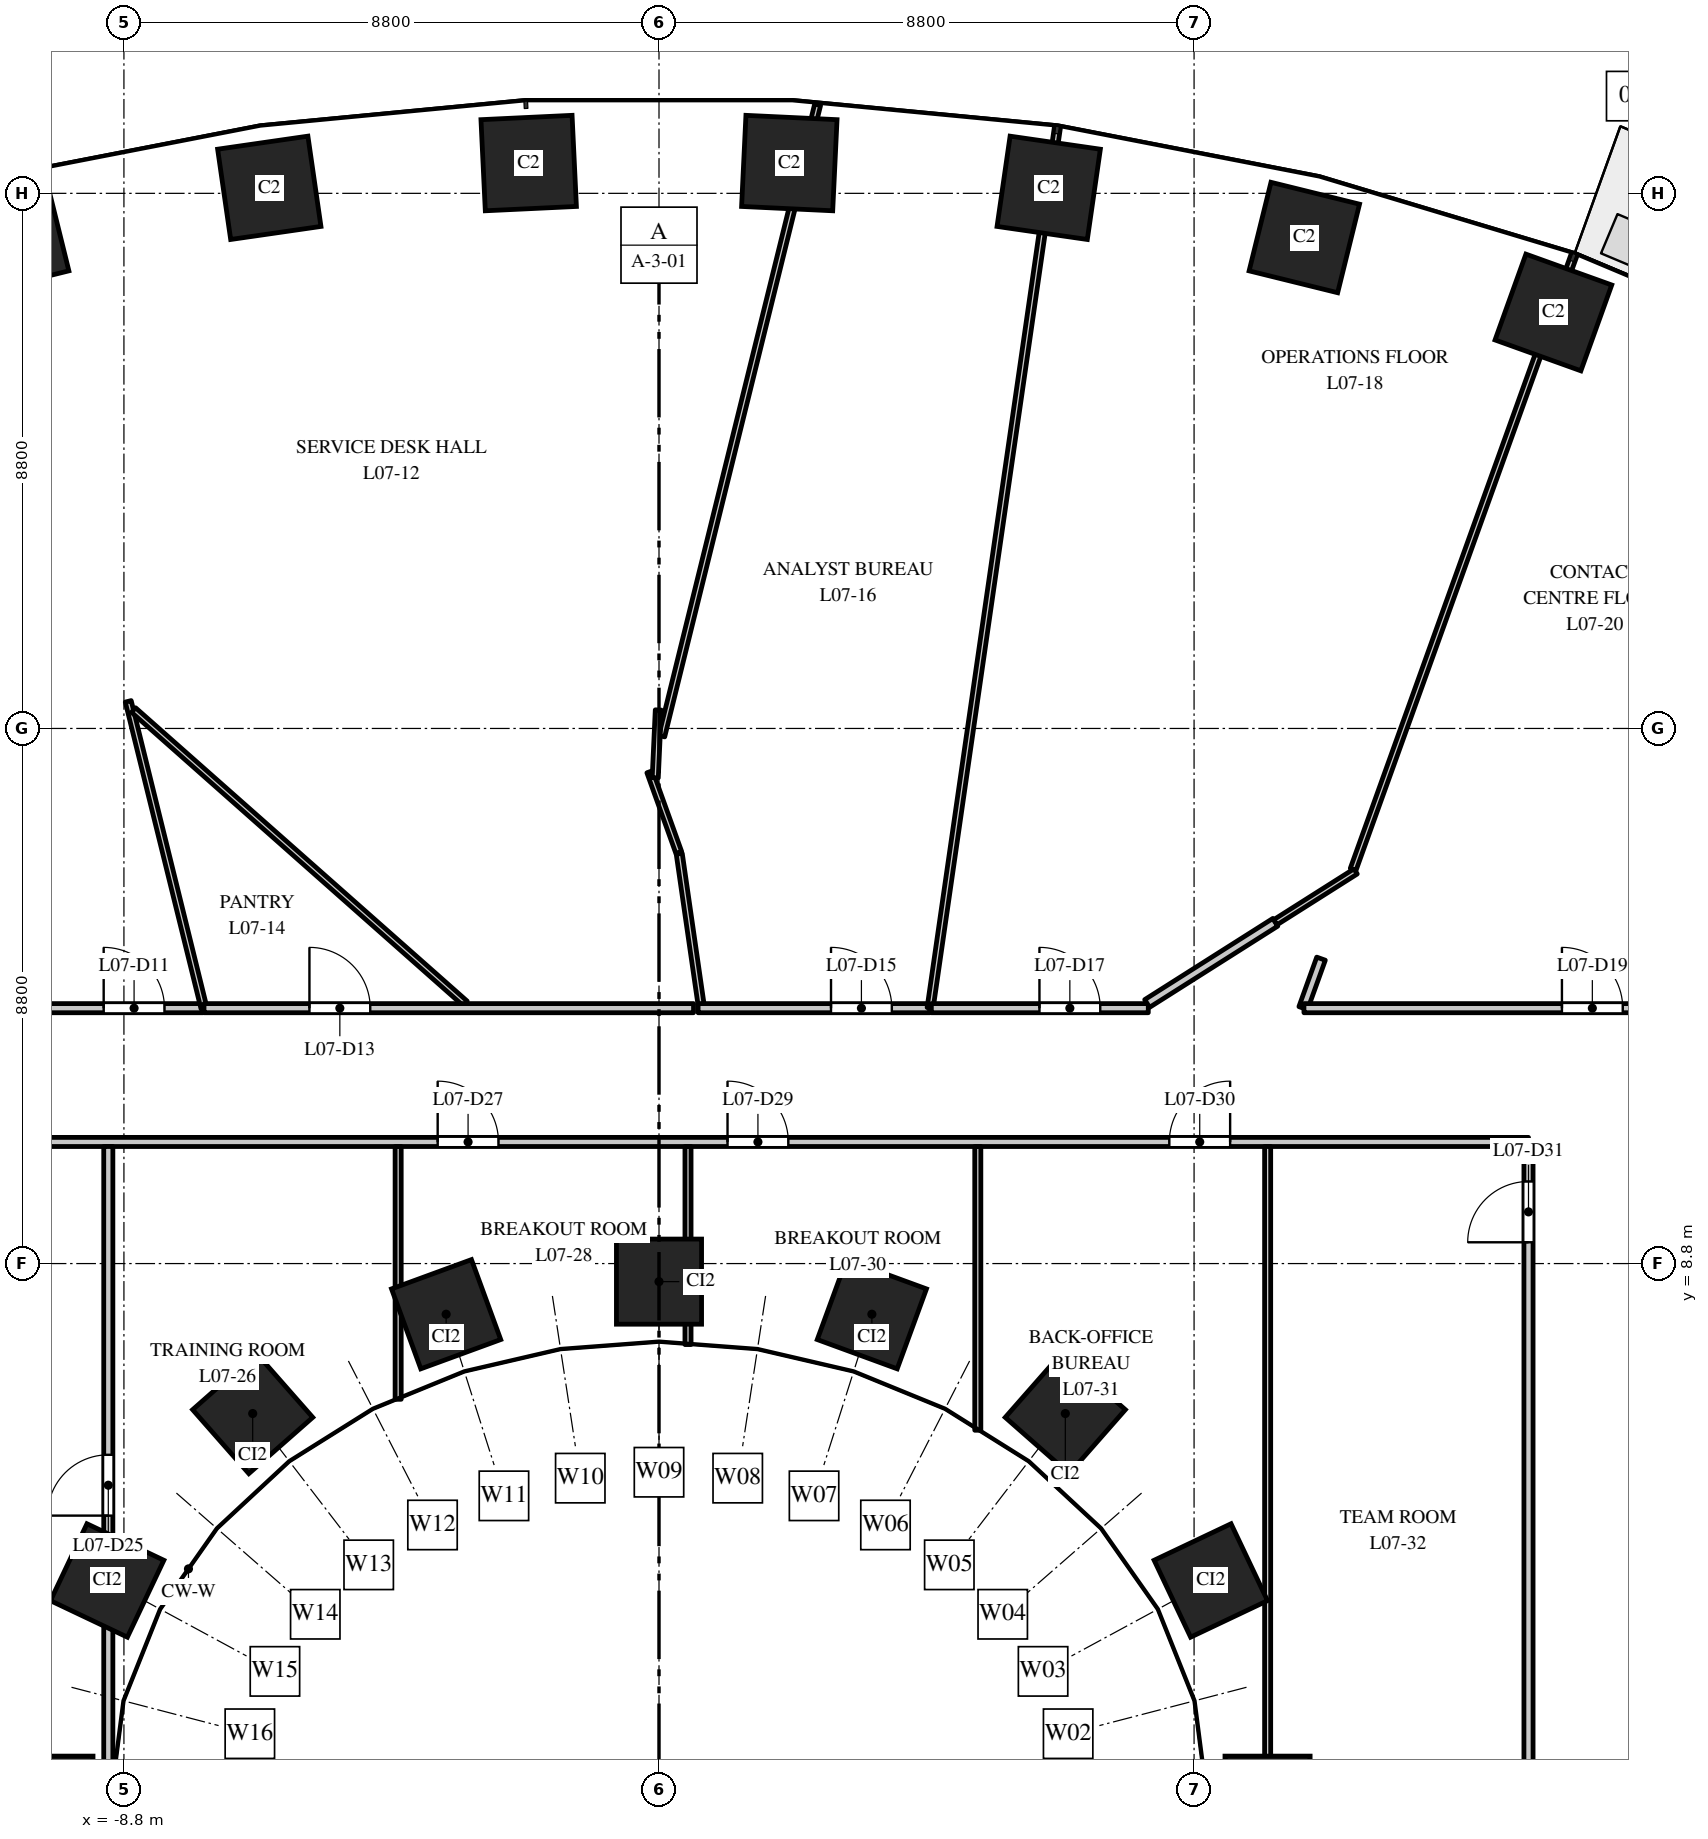
"""IFC4 building model, lengths in metres.
Left out: names, types, materials, properties, quantities, classifications, styles, units other than length and angle.
Written with IfcOpenShell. Run it as: python <this file> out.ifc"""

import sys

from ifc_helpers import new_model, si_unit, direction, frame, frame_2d, origin, origin_2d, place, context, subcontext, project, spatial, rectangle, extrude, element, fill, save


model = new_model("IFC4")
c1 = context("Model", 3, precision=1e-05, world=origin(), true_north=direction((0.0, 1.0)))
c2 = subcontext(c1, "Body", "Model", "MODEL_VIEW")
j1 = project(units=[si_unit("LENGTHUNIT", "METRE"), si_unit("PLANEANGLEUNIT", "RADIAN")], contexts=[c1])
p1 = place(None, origin())
s1 = spatial("IfcSite", under=j1, at=p1, CompositionType="ELEMENT")
p2 = place(p1, origin())
s2 = spatial("IfcBuilding", under=s1, at=p2, CompositionType="ELEMENT")
p3 = place(p2, frame((0.0, 0.0, 38.5)))
s3 = spatial("IfcBuildingStorey", under=s2, at=p3, CompositionType="ELEMENT", Elevation=38.5)
for number, where, z_axis, x_axis in (
    (1, (14.709, 24.441, 0.0), (0.0, 0.0, 1.0), (-0.941, 0.338, 0.0)),
    (2, (10.613, 25.674, 0.0), (0.0, 0.0, 1.0), (-0.971, 0.24, 0.0)),
    (3, (6.409, 26.491, 0.0), (0.0, 0.0, 1.0), (-0.99, 0.143, 0.0)),
    (4, (2.143, 26.898, 0.0), (0.0, 0.0, 1.0), (-0.999, 0.048, 0.0)),
    (5, (-2.143, 26.898, 0.0), (0.0, 0.0, 1.0), (-0.999, -0.048, 0.0)),
    (6, (-6.409, 26.491, 0.0), (0.0, 0.0, 1.0), (-0.99, -0.143, 0.0)),
    (7, (-10.613, 25.674, 0.0), (0.0, 0.0, 1.0), (-0.971, -0.24, 0.0)),
):
    element("IfcColumn", number, at=place(p3, frame(where, z_axis=z_axis, x_axis=x_axis)), inside=s3, PredefinedType="COLUMN", context=c2, shape_type="SweptSolid", body=[
        extrude(rectangle(XDim=1.5, YDim=1.5, at=origin_2d()), origin(), (0.0, 0.0, 1.0), 4.0),
    ])
for number, where, z_axis, x_axis in (
    (8, (10.008, 0.0, 0.0), (0.0, 0.0, 1.0), (0.0, 1.0, 0.0)),
    (9, (9.076, 3.588, 0.0), (0.0, 0.0, 1.0), (-0.429, 0.903, 0.0)),
    (10, (6.682, 6.334, 0.0), (0.0, 0.0, 1.0), (-0.751, 0.66, 0.0)),
    (11, (3.501, 7.967, 0.0), (0.0, 0.0, 1.0), (-0.939, 0.344, 0.0)),
    (12, (0.0, 8.503, 0.0), (0.0, 0.0, 1.0), (-1.0, 0.0, 0.0)),
    (13, (-3.501, 7.967, 0.0), (0.0, 0.0, 1.0), (-0.939, -0.344, 0.0)),
    (14, (-6.682, 6.334, 0.0), (0.0, 0.0, 1.0), (-0.751, -0.66, 0.0)),
    (15, (-9.076, 3.588, 0.0), (0.0, 0.0, 1.0), (-0.429, -0.903, 0.0)),
    (16, (-10.008, 0.0, 0.0), (0.0, 0.0, 1.0), (0.0, -1.0, 0.0)),
):
    element("IfcColumn", number, at=place(p3, frame(where, z_axis=z_axis, x_axis=x_axis)), inside=s3, PredefinedType="COLUMN", context=c2, shape_type="SweptSolid", body=[
        extrude(rectangle(XDim=1.4, YDim=1.4, at=origin_2d()), origin(), (0.0, 0.0, 1.0), 4.0),
    ])
p4 = place(p3, frame((-16.5, 13.0, 0.0), z_axis=(0.0, 0.0, 1.0), x_axis=(1.0, 0.0, 0.0)))
e17 = element("IfcWall", 17, at=p4, inside=s3, PredefinedType="PARTITIONING", context=c2, shape_type="SweptSolid", body=[
    extrude(rectangle(XDim=9.001, YDim=0.15, at=frame_2d((4.5, 0.0))), origin(), (0.0, 0.0, 1.0), 2.85),
])
p5 = place(p4, frame((7.367, 0.0, 0.0)))
e18 = element("IfcOpeningElement", 18, at=p5, cuts=e17, PredefinedType="OPENING", context=c2, shape_type="SweptSolid", body=[
    extrude(rectangle(XDim=1.0, YDim=2.1, at=frame_2d((0.5, 1.05))), frame((0.0, 0.085, 0.0), z_axis=(0.0, -1.0, 0.0), x_axis=(1.0, 0.0, 0.0)), (0.0, 0.0, 1.0), 0.17),
])
p6 = place(p3, frame((-14.3, 10.8, 0.0), z_axis=(0.0, 0.0, 1.0), x_axis=(1.0, 0.0, 0.0)))
e19 = element("IfcWall", 19, at=p6, inside=s3, PredefinedType="PARTITIONING", context=c2, shape_type="SweptSolid", body=[
    extrude(rectangle(XDim=28.6, YDim=0.15, at=frame_2d((14.3, 0.0))), origin(), (0.0, 0.0, 1.0), 2.85),
])
p7 = place(p6, frame((10.66, 0.0, 0.0)))
e20 = element("IfcOpeningElement", 20, at=p7, cuts=e19, PredefinedType="OPENING", context=c2, shape_type="SweptSolid", body=[
    extrude(rectangle(XDim=1.0, YDim=2.1, at=frame_2d((0.5, 1.05))), frame((0.0, 0.085, 0.0), z_axis=(0.0, -1.0, 0.0), x_axis=(1.0, 0.0, 0.0)), (0.0, 0.0, 1.0), 0.17),
])
p8 = place(p6, frame((15.427, 0.0, 0.0)))
e21 = element("IfcOpeningElement", 21, at=p8, cuts=e19, PredefinedType="OPENING", context=c2, shape_type="SweptSolid", body=[
    extrude(rectangle(XDim=1.0, YDim=2.1, at=frame_2d((0.5, 1.05))), frame((0.0, 0.085, 0.0), z_axis=(0.0, -1.0, 0.0), x_axis=(1.0, 0.0, 0.0)), (0.0, 0.0, 1.0), 0.17),
])
p9 = place(p6, frame((22.693, 0.0, 0.0)))
e22 = element("IfcOpeningElement", 22, at=p9, cuts=e19, PredefinedType="OPENING", context=c2, shape_type="SweptSolid", body=[
    extrude(rectangle(XDim=1.0, YDim=2.1, at=frame_2d((0.5, 1.05))), frame((0.0, 0.085, 0.0), z_axis=(0.0, -1.0, 0.0), x_axis=(1.0, 0.0, 0.0)), (0.0, 0.0, 1.0), 0.17),
])
p10 = place(p3, frame((-9.057, 0.045, 0.0), z_axis=(0.0, 0.0, 1.0), x_axis=(0.0, 1.0, 0.0)))
e23 = element("IfcWall", 23, at=p10, inside=s3, PredefinedType="PARTITIONING", context=c2, shape_type="SweptSolid", body=[
    extrude(rectangle(XDim=10.68, YDim=0.15, at=frame_2d((5.34, 0.0))), origin(), (0.0, 0.0, 1.0), 2.75),
])
p11 = place(p10, frame((4.61, 0.0, 0.0)))
e24 = element("IfcOpeningElement", 24, at=p11, cuts=e23, PredefinedType="OPENING", context=c2, shape_type="SweptSolid", body=[
    extrude(rectangle(XDim=1.0, YDim=2.1, at=frame_2d((0.5, 1.05))), frame((0.0, 0.085, 0.0), z_axis=(0.0, -1.0, 0.0), x_axis=(1.0, 0.0, 0.0)), (0.0, 0.0, 1.0), 0.17),
])
p12 = place(p3, frame((-8.729, 18.046, 0.0), z_axis=(0.0, 0.0, 1.0), x_axis=(0.239749411988, -0.970834805439, 0.0)))
e25 = element("IfcWall", 25, at=p12, inside=s3, PredefinedType="PARTITIONING", context=c2, shape_type="SweptSolid", body=[
    extrude(rectangle(XDim=5.198, YDim=0.1, at=frame_2d((2.599, 0.0))), origin(), (0.0, 0.0, 1.0), 3.7),
])
p13 = place(p3, frame((-8.642, 17.903, 0.0), z_axis=(0.0, 0.0, 1.0), x_axis=(0.749027274438, -0.662539162728, 0.0)))
e26 = element("IfcWall", 26, at=p13, inside=s3, PredefinedType="PARTITIONING", context=c2, shape_type="SweptSolid", body=[
    extrude(rectangle(XDim=7.283, YDim=0.1, at=frame_2d((3.642, 0.0))), origin(), (0.0, 0.0, 1.0), 2.85),
])
p14 = place(p3, frame((-7.483, 13.0, 0.0), z_axis=(0.0, 0.0, 1.0), x_axis=(1.0, 0.0, 0.0)))
e27 = element("IfcWall", 27, at=p14, inside=s3, PredefinedType="PARTITIONING", context=c2, shape_type="SweptSolid", body=[
    extrude(rectangle(XDim=8.051, YDim=0.15, at=frame_2d((4.025, 0.0))), origin(), (0.0, 0.0, 1.0), 2.85),
])
p15 = place(p14, frame((1.734, 0.0, 0.0)))
e28 = element("IfcOpeningElement", 28, at=p15, cuts=e27, PredefinedType="OPENING", context=c2, shape_type="SweptSolid", body=[
    extrude(rectangle(XDim=1.0, YDim=2.1, at=frame_2d((0.5, 1.05))), frame((0.0, 0.085, 0.0), z_axis=(0.0, -1.0, 0.0), x_axis=(1.0, 0.0, 0.0)), (0.0, 0.0, 1.0), 0.17),
])
p16 = place(p3, frame((-4.29, 6.568, 0.0), z_axis=(0.0, 0.0, 1.0), x_axis=(0.0, 1.0, 0.0)))
e29 = element("IfcWall", 29, at=p16, inside=s3, PredefinedType="PARTITIONING", context=c2, shape_type="SweptSolid", body=[
    extrude(rectangle(XDim=4.157, YDim=0.1, at=frame_2d((2.079, 0.0))), origin(), (0.0, 0.0, 1.0), 2.85),
])
p17 = place(p3, frame((-0.152, 16.888, 0.0), z_axis=(0.0, 0.0, 1.0), x_axis=(0.338272836404, -0.941048079617, 0.0)))
e30 = element("IfcWall", 30, at=p17, inside=s3, PredefinedType="PARTITIONING", context=c2, shape_type="SweptSolid", body=[
    extrude(rectangle(XDim=1.413, YDim=0.1, at=frame_2d((0.707, 0.0))), origin(), (0.0, 0.0, 1.0), 3.7),
])
p18 = place(p3, frame((0.045, 17.473, 0.0), z_axis=(0.0, 0.0, 1.0), x_axis=(0.239693715076, 0.970848558197, 0.0)))
e31 = element("IfcWall", 31, at=p18, inside=s3, PredefinedType="PARTITIONING", context=c2, shape_type="SweptSolid", body=[
    extrude(rectangle(XDim=10.697, YDim=0.1, at=frame_2d((5.348, 0.0))), origin(), (0.0, 0.0, 1.0), 2.85),
])
p19 = place(p3, frame((-0.062, 16.789, 0.0), z_axis=(0.0, 0.0, 1.0), x_axis=(0.045715238231, 0.998954511974, 0.0)))
e32 = element("IfcWall", 32, at=p19, inside=s3, PredefinedType="PARTITIONING", context=c2, shape_type="SweptSolid", body=[
    extrude(rectangle(XDim=1.116, YDim=0.1, at=frame_2d((0.558, 0.0))), origin(), (0.0, 0.0, 1.0), 3.7),
])
p20 = place(p3, frame((0.333, 15.539, 0.0), z_axis=(0.0, 0.0, 1.0), x_axis=(0.143115891067, -0.989705936996, 0.0)))
e33 = element("IfcWall", 33, at=p20, inside=s3, PredefinedType="PARTITIONING", context=c2, shape_type="SweptSolid", body=[
    extrude(rectangle(XDim=2.501, YDim=0.1, at=frame_2d((1.25, 0.0))), origin(), (0.0, 0.0, 1.0), 3.7),
])
p21 = place(p3, frame((0.477, 7.468, 0.0), z_axis=(0.0, 0.0, 1.0), x_axis=(0.0, 1.0, 0.0)))
e34 = element("IfcWall", 34, at=p21, inside=s3, PredefinedType="PARTITIONING", context=c2, shape_type="SweptSolid", body=[
    extrude(rectangle(XDim=3.257, YDim=0.1, at=frame_2d((1.628, 0.0))), origin(), (0.0, 0.0, 1.0), 2.85),
])
p22 = place(p3, frame((0.643, 13.0, 0.0), z_axis=(0.0, 0.0, 1.0), x_axis=(1.0, 0.0, 0.0)))
e35 = element("IfcWall", 35, at=p22, inside=s3, PredefinedType="PARTITIONING", context=c2, shape_type="SweptSolid", body=[
    extrude(rectangle(XDim=3.816, YDim=0.15, at=frame_2d((1.908, 0.0))), origin(), (0.0, 0.0, 1.0), 2.85),
])
p23 = place(p22, frame((2.186, 0.0, 0.0)))
e36 = element("IfcOpeningElement", 36, at=p23, cuts=e35, PredefinedType="OPENING", context=c2, shape_type="SweptSolid", body=[
    extrude(rectangle(XDim=1.0, YDim=2.1, at=frame_2d((0.5, 1.05))), frame((0.0, 0.085, 0.0), z_axis=(0.0, -1.0, 0.0), x_axis=(1.0, 0.0, 0.0)), (0.0, 0.0, 1.0), 0.17),
])
p24 = place(p3, frame((4.459, 13.004, 0.0), z_axis=(0.0, 0.0, 1.0), x_axis=(0.143087196312, 0.98971008596, 0.0)))
e37 = element("IfcWall", 37, at=p24, inside=s3, PredefinedType="PARTITIONING", context=c2, shape_type="SweptSolid", body=[
    extrude(rectangle(XDim=14.628, YDim=0.1, at=frame_2d((7.314, 0.0))), origin(), (0.0, 0.0, 1.0), 2.85),
])
p25 = place(p3, frame((4.479, 13.0, 0.0), z_axis=(0.0, 0.0, 1.0), x_axis=(1.0, 0.0, 0.0)))
e38 = element("IfcWall", 38, at=p25, inside=s3, PredefinedType="PARTITIONING", context=c2, shape_type="SweptSolid", body=[
    extrude(rectangle(XDim=3.568, YDim=0.15, at=frame_2d((1.784, 0.0))), origin(), (0.0, 0.0, 1.0), 2.85),
])
p26 = place(p25, frame((1.778, 0.0, 0.0)))
e39 = element("IfcOpeningElement", 39, at=p26, cuts=e38, PredefinedType="OPENING", context=c2, shape_type="SweptSolid", body=[
    extrude(rectangle(XDim=1.0, YDim=2.1, at=frame_2d((0.5, 1.05))), frame((0.0, 0.085, 0.0), z_axis=(0.0, -1.0, 0.0), x_axis=(1.0, 0.0, 0.0)), (0.0, 0.0, 1.0), 0.17),
])
p27 = place(p3, frame((5.243, 6.059, 0.0), z_axis=(0.0, 0.0, 1.0), x_axis=(0.0, 1.0, 0.0)))
e40 = element("IfcWall", 40, at=p27, inside=s3, PredefinedType="PARTITIONING", context=c2, shape_type="SweptSolid", body=[
    extrude(rectangle(XDim=4.666, YDim=0.1, at=frame_2d((2.333, 0.0))), origin(), (0.0, 0.0, 1.0), 2.85),
])
p28 = place(p3, frame((8.028, 13.077, 0.0), z_axis=(0.0, 0.0, 1.0), x_axis=(0.844718865656, 0.53521027457, 0.0)))
e41 = element("IfcWall", 41, at=p28, inside=s3, PredefinedType="PARTITIONING", context=c2, shape_type="SweptSolid", body=[
    extrude(rectangle(XDim=2.497, YDim=0.15, at=frame_2d((1.248, 0.0))), origin(), (0.0, 0.0, 1.0), 3.7),
])
p29 = place(p3, frame((10.01, -10.725, 0.0), z_axis=(0.0, 0.0, 1.0), x_axis=(0.0, 1.0, 0.0)))
e42 = element("IfcWall", 42, at=p29, inside=s3, PredefinedType="PARTITIONING", context=c2, shape_type="SweptSolid", body=[
    extrude(rectangle(XDim=21.45, YDim=0.1, at=frame_2d((10.725, 0.0))), origin(), (0.0, 0.0, 1.0), 2.75),
])
p30 = place(p3, frame((10.137, 14.413, 0.0), z_axis=(0.0, 0.0, 1.0), x_axis=(0.844849680057, 0.535003755228, 0.0)))
e43 = element("IfcWall", 43, at=p30, inside=s3, PredefinedType="PARTITIONING", context=c2, shape_type="SweptSolid", body=[
    extrude(rectangle(XDim=1.562, YDim=0.1, at=frame_2d((0.781, 0.0))), origin(), (0.0, 0.0, 1.0), 3.7),
])
p31 = place(p3, frame((10.595, 13.0, 0.0), z_axis=(0.0, 0.0, 1.0), x_axis=(0.338659506624, 0.940908995904, 0.0)))
e44 = element("IfcWall", 44, at=p31, inside=s3, PredefinedType="PARTITIONING", context=c2, shape_type="SweptSolid", body=[
    extrude(rectangle(XDim=0.865, YDim=0.15, at=frame_2d((0.433, 0.0))), origin(), (0.0, 0.0, 1.0), 3.7),
])
p32 = place(p3, frame((10.607, 13.0, 0.0), z_axis=(0.0, 0.0, 1.0), x_axis=(1.0, 0.0, 0.0)))
e45 = element("IfcWall", 45, at=p32, inside=s3, PredefinedType="PARTITIONING", context=c2, shape_type="SweptSolid", body=[
    extrude(rectangle(XDim=5.893, YDim=0.15, at=frame_2d((2.947, 0.0))), origin(), (0.0, 0.0, 1.0), 3.7),
])
p33 = place(p32, frame((4.243, 0.0, 0.0)))
e46 = element("IfcOpeningElement", 46, at=p33, cuts=e45, PredefinedType="OPENING", context=c2, shape_type="SweptSolid", body=[
    extrude(rectangle(XDim=1.0, YDim=2.1, at=frame_2d((0.5, 1.05))), frame((0.0, 0.085, 0.0), z_axis=(0.0, -1.0, 0.0), x_axis=(1.0, 0.0, 0.0)), (0.0, 0.0, 1.0), 0.17),
])
p34 = place(p3, frame((11.416, 15.282, 0.0), z_axis=(0.0, 0.0, 1.0), x_axis=(0.338364268616, 0.94101520802, 0.0)))
e47 = element("IfcWall", 47, at=p34, inside=s3, PredefinedType="PARTITIONING", context=c2, shape_type="SweptSolid", body=[
    extrude(rectangle(XDim=10.734, YDim=0.1, at=frame_2d((5.367, 0.0))), origin(), (0.0, 0.0, 1.0), 3.7),
])
p35 = place(p3, frame((14.3, -10.8, 0.0), z_axis=(0.0, 0.0, 1.0), x_axis=(0.0, 1.0, 0.0)))
e48 = element("IfcWall", 48, at=p35, inside=s3, PredefinedType="PARTITIONING", context=c2, shape_type="SweptSolid", body=[
    extrude(rectangle(XDim=21.6, YDim=0.15, at=frame_2d((10.8, 0.0))), origin(), (0.0, 0.0, 1.0), 2.75),
])
p36 = place(p35, frame((19.95, 0.0, 0.0)))
e49 = element("IfcOpeningElement", 49, at=p36, cuts=e48, PredefinedType="OPENING", context=c2, shape_type="SweptSolid", body=[
    extrude(rectangle(XDim=1.0, YDim=2.1, at=frame_2d((0.5, 1.05))), frame((0.0, 0.085, 0.0), z_axis=(0.0, -1.0, 0.0), x_axis=(1.0, 0.0, 0.0)), (0.0, 0.0, 1.0), 0.17),
])
p37 = place(p5, origin())
e50 = element("IfcDoor", 50, at=p37, inside=s3, OperationType="SINGLE_SWING_LEFT", PredefinedType="DOOR", context=c2, shape_type="SweptSolid", body=[
    extrude(rectangle(XDim=1.0, YDim=2.1, at=frame_2d((0.5, 1.05))), frame((0.0, 0.025, 0.0), z_axis=(0.0, -1.0, 0.0), x_axis=(1.0, 0.0, 0.0)), (0.0, 0.0, 1.0), 0.05),
])
fill(e18, e50)
p38 = place(p15, origin())
e51 = element("IfcDoor", 51, at=p38, inside=s3, OperationType="SINGLE_SWING_LEFT", PredefinedType="DOOR", context=c2, shape_type="SweptSolid", body=[
    extrude(rectangle(XDim=1.0, YDim=2.1, at=frame_2d((0.5, 1.05))), frame((0.0, 0.025, 0.0), z_axis=(0.0, -1.0, 0.0), x_axis=(1.0, 0.0, 0.0)), (0.0, 0.0, 1.0), 0.05),
])
fill(e28, e51)
p39 = place(p23, origin())
e52 = element("IfcDoor", 52, at=p39, inside=s3, OperationType="SINGLE_SWING_LEFT", PredefinedType="DOOR", context=c2, shape_type="SweptSolid", body=[
    extrude(rectangle(XDim=1.0, YDim=2.1, at=frame_2d((0.5, 1.05))), frame((0.0, 0.025, 0.0), z_axis=(0.0, -1.0, 0.0), x_axis=(1.0, 0.0, 0.0)), (0.0, 0.0, 1.0), 0.05),
])
fill(e36, e52)
p40 = place(p26, origin())
e53 = element("IfcDoor", 53, at=p40, inside=s3, OperationType="SINGLE_SWING_LEFT", PredefinedType="DOOR", context=c2, shape_type="SweptSolid", body=[
    extrude(rectangle(XDim=1.0, YDim=2.1, at=frame_2d((0.5, 1.05))), frame((0.0, 0.025, 0.0), z_axis=(0.0, -1.0, 0.0), x_axis=(1.0, 0.0, 0.0)), (0.0, 0.0, 1.0), 0.05),
])
fill(e39, e53)
p41 = place(p33, origin())
e54 = element("IfcDoor", 54, at=p41, inside=s3, OperationType="SINGLE_SWING_LEFT", PredefinedType="DOOR", context=c2, shape_type="SweptSolid", body=[
    extrude(rectangle(XDim=1.0, YDim=2.1, at=frame_2d((0.5, 1.05))), frame((0.0, 0.025, 0.0), z_axis=(0.0, -1.0, 0.0), x_axis=(1.0, 0.0, 0.0)), (0.0, 0.0, 1.0), 0.05),
])
fill(e46, e54)
p42 = place(p11, origin())
e55 = element("IfcDoor", 55, at=p42, inside=s3, OperationType="SINGLE_SWING_LEFT", PredefinedType="DOOR", context=c2, shape_type="SweptSolid", body=[
    extrude(rectangle(XDim=1.0, YDim=2.1, at=frame_2d((0.5, 1.05))), frame((0.0, 0.025, 0.0), z_axis=(0.0, -1.0, 0.0), x_axis=(1.0, 0.0, 0.0)), (0.0, 0.0, 1.0), 0.05),
])
fill(e24, e55)
p43 = place(p7, origin())
e56 = element("IfcDoor", 56, at=p43, inside=s3, OperationType="SINGLE_SWING_LEFT", PredefinedType="DOOR", context=c2, shape_type="SweptSolid", body=[
    extrude(rectangle(XDim=1.0, YDim=2.1, at=frame_2d((0.5, 1.05))), frame((0.0, 0.025, 0.0), z_axis=(0.0, -1.0, 0.0), x_axis=(1.0, 0.0, 0.0)), (0.0, 0.0, 1.0), 0.05),
])
fill(e20, e56)
p44 = place(p8, origin())
e57 = element("IfcDoor", 57, at=p44, inside=s3, OperationType="SINGLE_SWING_LEFT", PredefinedType="DOOR", context=c2, shape_type="SweptSolid", body=[
    extrude(rectangle(XDim=1.0, YDim=2.1, at=frame_2d((0.5, 1.05))), frame((0.0, 0.025, 0.0), z_axis=(0.0, -1.0, 0.0), x_axis=(1.0, 0.0, 0.0)), (0.0, 0.0, 1.0), 0.05),
])
fill(e21, e57)
p45 = place(p9, origin())
e58 = element("IfcDoor", 58, at=p45, inside=s3, OperationType="SINGLE_SWING_RIGHT", PredefinedType="DOOR", context=c2, shape_type="SweptSolid", body=[
    extrude(rectangle(XDim=1.0, YDim=2.1, at=frame_2d((0.5, 1.05))), frame((0.0, 0.025, 0.0), z_axis=(0.0, -1.0, 0.0), x_axis=(1.0, 0.0, 0.0)), (0.0, 0.0, 1.0), 0.05),
])
fill(e22, e58)
p46 = place(p36, origin())
e59 = element("IfcDoor", 59, at=p46, inside=s3, OperationType="SINGLE_SWING_LEFT", PredefinedType="DOOR", context=c2, shape_type="SweptSolid", body=[
    extrude(rectangle(XDim=1.0, YDim=2.1, at=frame_2d((0.5, 1.05))), frame((0.0, 0.025, 0.0), z_axis=(0.0, -1.0, 0.0), x_axis=(1.0, 0.0, 0.0)), (0.0, 0.0, 1.0), 0.05),
])
fill(e49, e59)
save(model, sys.argv[1])
